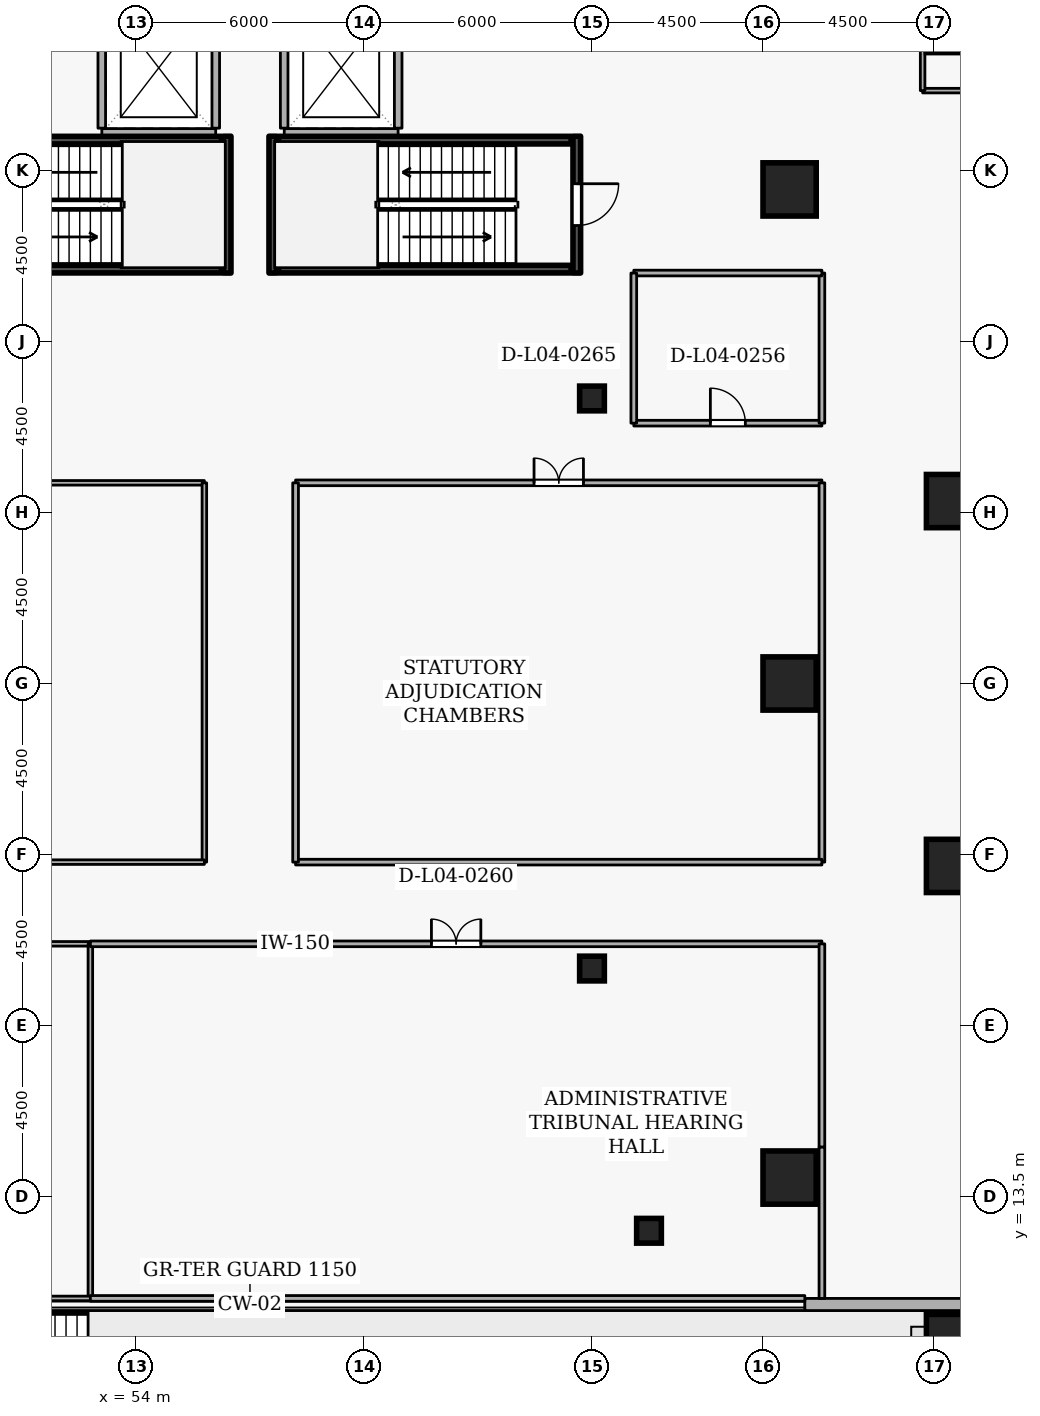
"""IFC4 building model, lengths in metres.
Left out: names, types, materials, properties, quantities, classifications, styles, units other than length and angle.
Written with IfcOpenShell. Run it as: python <this file> out.ifc"""

import sys

from ifc_helpers import new_model, si_unit, direction, frame, frame_2d, origin, origin_2d, place, context, subcontext, project, spatial, rectangle, extrude, element, fill, save


model = new_model("IFC4")
c1 = context("Model", 3, precision=1e-05, world=origin(), true_north=direction((0.0, 1.0)))
c2 = subcontext(c1, "Body", "Model", "MODEL_VIEW")
j1 = project(units=[si_unit("LENGTHUNIT", "METRE"), si_unit("PLANEANGLEUNIT", "RADIAN")], contexts=[c1])
p1 = place(None, origin())
s1 = spatial("IfcSite", under=j1, at=p1, CompositionType="ELEMENT")
p2 = place(p1, origin())
s2 = spatial("IfcBuilding", under=s1, at=p2, CompositionType="ELEMENT")
p3 = place(p2, frame((0.0, 0.0, 18.6)))
s3 = spatial("IfcBuildingStorey", under=s2, at=p3, CompositionType="ELEMENT", Elevation=18.6)
for number, where, z_axis, x_axis in (
    (1, (71.2, 14.0, 0.0), (0.0, 0.0, 1.0), (1.0, 0.0, 0.0)),
    (2, (71.2, 27.0, 0.0), (0.0, 0.0, 1.0), (1.0, 0.0, 0.0)),
    (3, (71.2, 40.0, 0.0), (0.0, 0.0, 1.0), (1.0, 0.0, 0.0)),
    (4, (75.5, 9.7, 0.0), (0.0, 0.0, 1.0), (1.0, 0.0, 0.0)),
    (5, (75.5, 22.2, 0.0), (0.0, 0.0, 1.0), (1.0, 0.0, 0.0)),
    (6, (75.5, 31.8, 0.0), (0.0, 0.0, 1.0), (1.0, 0.0, 0.0)),
):
    element("IfcColumn", number, at=place(p3, frame(where, z_axis=z_axis, x_axis=x_axis)), inside=s3, PredefinedType="COLUMN", context=c2, shape_type="SweptSolid", body=[
        extrude(rectangle(XDim=1.4, YDim=1.4, at=origin_2d()), origin(), (0.0, 0.0, 1.0), 4.5),
    ])
for number, where, z_axis, x_axis in (
    (7, (67.5, 12.6, 0.0), (0.0, 0.0, 1.0), (1.0, 0.0, 0.0)),
    (8, (66.0, 19.5, 0.0), (0.0, 0.0, 1.0), (1.0, 0.0, 0.0)),
    (9, (66.0, 34.5, 0.0), (0.0, 0.0, 1.0), (1.0, 0.0, 0.0)),
):
    element("IfcColumn", number, at=place(p3, frame(where, z_axis=z_axis, x_axis=x_axis)), inside=s3, PredefinedType="COLUMN", context=c2, shape_type="SweptSolid", body=[
        extrude(rectangle(XDim=0.65, YDim=0.65, at=origin_2d()), origin(), (0.0, 0.0, 1.0), 4.5),
    ])
p4 = place(p3, frame((71.6, 10.66, 0.0), z_axis=(0.0, 0.0, 1.0), x_axis=(1.0, 0.0, 0.0)))
e10 = element("IfcWall", 10, at=p4, inside=s3, PredefinedType="STANDARD", context=c2, shape_type="SweptSolid", body=[
    extrude(rectangle(XDim=39.4, YDim=0.32, at=frame_2d((19.7, 0.0))), origin(), (0.0, 0.0, 1.0), 3.56),
])
p5 = place(p4, frame((13.5, 0.0, 0.0)))
e11 = element("IfcOpeningElement", 11, at=p5, cuts=e10, PredefinedType="OPENING", context=c2, shape_type="SweptSolid", body=[
    extrude(rectangle(XDim=1.15, YDim=2.1, at=frame_2d((0.575, 1.05))), frame((0.0, 0.17, 0.0), z_axis=(0.0, -1.0, 0.0), x_axis=(1.0, 0.0, 0.0)), (0.0, 0.0, 1.0), 0.34),
])
p6 = place(p4, frame((22.8, 0.0, 0.78)))
e12 = element("IfcOpeningElement", 12, at=p6, cuts=e10, PredefinedType="OPENING", context=c2, shape_type="SweptSolid", body=[
    extrude(rectangle(XDim=1.8, YDim=2.15, at=frame_2d((0.9, 1.075))), frame((0.0, 0.17, 0.0), z_axis=(0.0, -1.0, 0.0), x_axis=(1.0, 0.0, 0.0)), (0.0, 0.0, 1.0), 0.34),
])
p7 = place(p4, frame((32.8, 0.0, 0.78)))
e13 = element("IfcOpeningElement", 13, at=p7, cuts=e10, PredefinedType="OPENING", context=c2, shape_type="SweptSolid", body=[
    extrude(rectangle(XDim=1.8, YDim=2.15, at=frame_2d((0.9, 1.075))), frame((0.0, 0.17, 0.0), z_axis=(0.0, -1.0, 0.0), x_axis=(1.0, 0.0, 0.0)), (0.0, 0.0, 1.0), 0.34),
])
p8 = place(p3, frame((53.102, 41.5, 0.0), z_axis=(0.0, 0.0, 1.0), x_axis=(1.0, 0.0, 0.0)))
e14 = element("IfcWall", 14, at=p8, inside=s3, PredefinedType="STANDARD", context=c2, shape_type="SweptSolid", body=[
    extrude(rectangle(XDim=2.996, YDim=0.2, at=frame_2d((1.498, 0.0))), origin(), (0.0, 0.0, 1.0), 4.16),
])
for number, where, z_axis, x_axis in (
    (15, (56.1, 41.612, 0.0), (0.0, 0.0, 1.0), (0.0, 1.0, 0.0)),
    (16, (53.1, 41.612, 0.0), (0.0, 0.0, 1.0), (0.0, 1.0, 0.0)),
):
    element("IfcWall", number, at=place(p3, frame(where, z_axis=z_axis, x_axis=x_axis)), inside=s3, PredefinedType="STANDARD", context=c2, shape_type="SweptSolid", body=[
        extrude(rectangle(XDim=3.286, YDim=0.2, at=frame_2d((1.643, 0.0))), origin(), (0.0, 0.0, 1.0), 4.16),
    ])
p9 = place(p3, frame((57.902, 41.5, 0.0), z_axis=(0.0, 0.0, 1.0), x_axis=(1.0, 0.0, 0.0)))
e17 = element("IfcWall", 17, at=p9, inside=s3, PredefinedType="STANDARD", context=c2, shape_type="SweptSolid", body=[
    extrude(rectangle(XDim=2.996, YDim=0.2, at=frame_2d((1.498, 0.0))), origin(), (0.0, 0.0, 1.0), 4.16),
])
for number, where, z_axis, x_axis in (
    (18, (60.9, 41.612, 0.0), (0.0, 0.0, 1.0), (0.0, 1.0, 0.0)),
    (19, (57.9, 41.612, 0.0), (0.0, 0.0, 1.0), (0.0, 1.0, 0.0)),
):
    element("IfcWall", number, at=place(p3, frame(where, z_axis=z_axis, x_axis=x_axis)), inside=s3, PredefinedType="STANDARD", context=c2, shape_type="SweptSolid", body=[
        extrude(rectangle(XDim=3.286, YDim=0.2, at=frame_2d((1.643, 0.0))), origin(), (0.0, 0.0, 1.0), 4.16),
    ])
p10 = place(p3, frame((56.4, 41.4, 0.0), z_axis=(0.0, 0.0, 1.0), x_axis=(0.0, -1.0, 0.0)))
e20 = element("IfcWall", 20, at=p10, inside=s3, PredefinedType="SHEAR", context=c2, shape_type="SweptSolid", body=[
    extrude(rectangle(XDim=3.6, YDim=0.2, at=frame_2d((1.8, 0.0))), origin(), (0.0, 0.0, 1.0), 4.5),
])
for number, where, z_axis, x_axis in (
    (21, (56.25, 41.297, 0.0), (0.0, 0.0, 1.0), (-1.0, 0.0, 0.0)),
    (22, (48.55, 37.903, 0.0), (0.0, 0.0, 1.0), (1.0, 0.0, 0.0)),
):
    element("IfcWall", number, at=place(p3, frame(where, z_axis=z_axis, x_axis=x_axis)), inside=s3, PredefinedType="SHEAR", context=c2, shape_type="SweptSolid", body=[
        extrude(rectangle(XDim=7.7, YDim=0.2, at=frame_2d((3.85, 0.0))), origin(), (0.0, 0.0, 1.0), 4.5),
    ])
p11 = place(p3, frame((65.6, 41.4, 0.0), z_axis=(0.0, 0.0, 1.0), x_axis=(0.0, -1.0, 0.0)))
e23 = element("IfcWall", 23, at=p11, inside=s3, PredefinedType="SHEAR", context=c2, shape_type="SweptSolid", body=[
    extrude(rectangle(XDim=3.6, YDim=0.2, at=frame_2d((1.8, 0.0))), origin(), (0.0, 0.0, 1.0), 4.5),
])
p12 = place(p11, frame((1.25, 0.0, 0.0)))
e24 = element("IfcOpeningElement", 24, at=p12, cuts=e23, PredefinedType="OPENING", context=c2, shape_type="SweptSolid", body=[
    extrude(rectangle(XDim=1.1, YDim=2.1, at=frame_2d((0.55, 1.05))), frame((0.0, 0.11, 0.0), z_axis=(0.0, -1.0, 0.0), x_axis=(1.0, 0.0, 0.0)), (0.0, 0.0, 1.0), 0.22),
])
p13 = place(p3, frame((57.6, 37.8, 0.0), z_axis=(0.0, 0.0, 1.0), x_axis=(0.0, 1.0, 0.0)))
e25 = element("IfcWall", 25, at=p13, inside=s3, PredefinedType="SHEAR", context=c2, shape_type="SweptSolid", body=[
    extrude(rectangle(XDim=3.6, YDim=0.2, at=frame_2d((1.8, 0.0))), origin(), (0.0, 0.0, 1.0), 4.5),
])
for number, where, z_axis, x_axis in (
    (26, (57.75, 37.903, 0.0), (0.0, 0.0, 1.0), (1.0, 0.0, 0.0)),
    (27, (65.45, 41.297, 0.0), (0.0, 0.0, 1.0), (-1.0, 0.0, 0.0)),
):
    element("IfcWall", number, at=place(p3, frame(where, z_axis=z_axis, x_axis=x_axis)), inside=s3, PredefinedType="SHEAR", context=c2, shape_type="SweptSolid", body=[
        extrude(rectangle(XDim=7.7, YDim=0.2, at=frame_2d((3.85, 0.0))), origin(), (0.0, 0.0, 1.0), 4.5),
    ])
p14 = place(p3, frame((67.1, 33.85, 0.0), z_axis=(0.0, 0.0, 1.0), x_axis=(1.0, 0.0, 0.0)))
e28 = element("IfcWall", 28, at=p14, inside=s3, PredefinedType="PARTITIONING", context=c2, shape_type="SweptSolid", body=[
    extrude(rectangle(XDim=4.95, YDim=0.15, at=frame_2d((2.475, 0.0))), origin(), (0.0, 0.0, 1.0), 4.16),
])
p15 = place(p14, frame((2.015, 0.0, 0.0)))
e29 = element("IfcOpeningElement", 29, at=p15, cuts=e28, PredefinedType="OPENING", context=c2, shape_type="SweptSolid", body=[
    extrude(rectangle(XDim=0.92, YDim=2.08, at=frame_2d((0.46, 1.04))), frame((0.0, 0.085, 0.0), z_axis=(0.0, -1.0, 0.0), x_axis=(1.0, 0.0, 0.0)), (0.0, 0.0, 1.0), 0.17),
])
p16 = place(p3, frame((72.05, 33.85, 0.0), z_axis=(0.0, 0.0, 1.0), x_axis=(0.0, 1.0, 0.0)))
e30 = element("IfcWall", 30, at=p16, inside=s3, PredefinedType="PARTITIONING", context=c2, shape_type="SweptSolid", body=[
    extrude(rectangle(XDim=3.95, YDim=0.15, at=frame_2d((1.975, 0.0))), origin(), (0.0, 0.0, 1.0), 4.16),
])
p17 = place(p3, frame((72.05, 37.8, 0.0), z_axis=(0.0, 0.0, 1.0), x_axis=(-1.0, 0.0, 0.0)))
e31 = element("IfcWall", 31, at=p17, inside=s3, PredefinedType="PARTITIONING", context=c2, shape_type="SweptSolid", body=[
    extrude(rectangle(XDim=4.95, YDim=0.15, at=frame_2d((2.475, 0.0))), origin(), (0.0, 0.0, 1.0), 4.16),
])
p18 = place(p3, frame((67.1, 37.8, 0.0), z_axis=(0.0, 0.0, 1.0), x_axis=(0.0, -1.0, 0.0)))
e32 = element("IfcWall", 32, at=p18, inside=s3, PredefinedType="PARTITIONING", context=c2, shape_type="SweptSolid", body=[
    extrude(rectangle(XDim=3.95, YDim=0.15, at=frame_2d((1.975, 0.0))), origin(), (0.0, 0.0, 1.0), 4.16),
])
p19 = place(p3, frame((33.5, 20.15, 0.0), z_axis=(0.0, 0.0, 1.0), x_axis=(1.0, 0.0, 0.0)))
e33 = element("IfcWall", 33, at=p19, inside=s3, PredefinedType="PARTITIONING", context=c2, shape_type="SweptSolid", body=[
    extrude(rectangle(XDim=19.3, YDim=0.12, at=frame_2d((9.65, 0.0))), origin(), (0.0, 0.0, 1.0), 4.16),
])
p20 = place(p19, frame((9.125, 0.0, 0.0)))
e34 = element("IfcOpeningElement", 34, at=p20, cuts=e33, PredefinedType="OPENING", context=c2, shape_type="SweptSolid", body=[
    extrude(rectangle(XDim=1.05, YDim=2.1, at=frame_2d((0.525, 1.05))), frame((0.0, 0.07, 0.0), z_axis=(0.0, -1.0, 0.0), x_axis=(1.0, 0.0, 0.0)), (0.0, 0.0, 1.0), 0.14),
])
p21 = place(p3, frame((52.8, 20.15, 0.0), z_axis=(0.0, 0.0, 1.0), x_axis=(0.0, -1.0, 0.0)))
e35 = element("IfcWall", 35, at=p21, inside=s3, PredefinedType="PARTITIONING", context=c2, shape_type="SweptSolid", body=[
    extrude(rectangle(XDim=9.33, YDim=0.12, at=frame_2d((4.665, 0.0))), origin(), (0.0, 0.0, 1.0), 4.16),
])
p22 = place(p3, frame((52.8, 10.82, 0.0), z_axis=(0.0, 0.0, 1.0), x_axis=(-1.0, 0.0, 0.0)))
e36 = element("IfcWall", 36, at=p22, inside=s3, PredefinedType="PARTITIONING", context=c2, shape_type="SweptSolid", body=[
    extrude(rectangle(XDim=10.4, YDim=0.12, at=frame_2d((5.2, 0.0))), origin(), (0.0, 0.0, 1.0), 4.16),
])
p23 = place(p3, frame((52.8, 20.15, 0.0), z_axis=(0.0, 0.0, 1.0), x_axis=(1.0, 0.0, 0.0)))
e37 = element("IfcWall", 37, at=p23, inside=s3, PredefinedType="PARTITIONING", context=c2, shape_type="SweptSolid", body=[
    extrude(rectangle(XDim=19.25, YDim=0.15, at=frame_2d((9.625, 0.0))), origin(), (0.0, 0.0, 1.0), 4.16),
])
p24 = place(p23, frame((8.975, 0.0, 0.0)))
e38 = element("IfcOpeningElement", 38, at=p24, cuts=e37, PredefinedType="OPENING", context=c2, shape_type="SweptSolid", body=[
    extrude(rectangle(XDim=1.3, YDim=2.12, at=frame_2d((0.65, 1.06))), frame((0.0, 0.085, 0.0), z_axis=(0.0, -1.0, 0.0), x_axis=(1.0, 0.0, 0.0)), (0.0, 0.0, 1.0), 0.17),
])
p25 = place(p3, frame((72.05, 20.15, 0.0), z_axis=(0.0, 0.0, 1.0), x_axis=(0.0, -1.0, 0.0)))
e39 = element("IfcWall", 39, at=p25, inside=s3, PredefinedType="PARTITIONING", context=c2, shape_type="SweptSolid", body=[
    extrude(rectangle(XDim=5.35, YDim=0.15, at=frame_2d((2.675, 0.0))), origin(), (0.0, 0.0, 1.0), 4.16),
])
p26 = place(p3, frame((72.05, 14.8, 0.0), z_axis=(0.0, 0.0, 1.0), x_axis=(0.0, -1.0, 0.0)))
e40 = element("IfcWall", 40, at=p26, inside=s3, PredefinedType="PARTITIONING", context=c2, shape_type="SweptSolid", body=[
    extrude(rectangle(XDim=3.98, YDim=0.15, at=frame_2d((1.99, 0.0))), origin(), (0.0, 0.0, 1.0), 4.16),
])
p27 = place(p3, frame((71.6, 10.82, 0.0), z_axis=(0.0, 0.0, 1.0), x_axis=(-1.0, 0.0, 0.0)))
e41 = element("IfcWall", 41, at=p27, inside=s3, PredefinedType="PARTITIONING", context=c2, shape_type="SweptSolid", body=[
    extrude(rectangle(XDim=18.8, YDim=0.15, at=frame_2d((9.4, 0.0))), origin(), (0.0, 0.0, 1.0), 4.16),
])
p28 = place(p3, frame((38.0, 32.28, 0.0), z_axis=(0.0, 0.0, 1.0), x_axis=(1.0, 0.0, 0.0)))
e42 = element("IfcWall", 42, at=p28, inside=s3, PredefinedType="PARTITIONING", context=c2, shape_type="SweptSolid", body=[
    extrude(rectangle(XDim=17.8, YDim=0.12, at=frame_2d((8.9, 0.0))), origin(), (0.0, 0.0, 1.0), 4.16),
])
p29 = place(p28, frame((8.375, 0.0, 0.0)))
e43 = element("IfcOpeningElement", 43, at=p29, cuts=e42, PredefinedType="OPENING", context=c2, shape_type="SweptSolid", body=[
    extrude(rectangle(XDim=1.05, YDim=2.1, at=frame_2d((0.525, 1.05))), frame((0.0, 0.07, 0.0), z_axis=(0.0, -1.0, 0.0), x_axis=(1.0, 0.0, 0.0)), (0.0, 0.0, 1.0), 0.14),
])
p30 = place(p3, frame((55.8, 32.28, 0.0), z_axis=(0.0, 0.0, 1.0), x_axis=(0.0, -1.0, 0.0)))
e44 = element("IfcWall", 44, at=p30, inside=s3, PredefinedType="PARTITIONING", context=c2, shape_type="SweptSolid", body=[
    extrude(rectangle(XDim=9.98, YDim=0.12, at=frame_2d((4.99, 0.0))), origin(), (0.0, 0.0, 1.0), 4.16),
])
p31 = place(p3, frame((55.8, 22.3, 0.0), z_axis=(0.0, 0.0, 1.0), x_axis=(-1.0, 0.0, 0.0)))
e45 = element("IfcWall", 45, at=p31, inside=s3, PredefinedType="PARTITIONING", context=c2, shape_type="SweptSolid", body=[
    extrude(rectangle(XDim=17.8, YDim=0.12, at=frame_2d((8.9, 0.0))), origin(), (0.0, 0.0, 1.0), 4.16),
])
p32 = place(p3, frame((58.2, 32.28, 0.0), z_axis=(0.0, 0.0, 1.0), x_axis=(1.0, 0.0, 0.0)))
e46 = element("IfcWall", 46, at=p32, inside=s3, PredefinedType="PARTITIONING", context=c2, shape_type="SweptSolid", body=[
    extrude(rectangle(XDim=13.85, YDim=0.15, at=frame_2d((6.925, 0.0))), origin(), (0.0, 0.0, 1.0), 4.16),
])
p33 = place(p32, frame((6.275, 0.0, 0.0)))
e47 = element("IfcOpeningElement", 47, at=p33, cuts=e46, PredefinedType="OPENING", context=c2, shape_type="SweptSolid", body=[
    extrude(rectangle(XDim=1.3, YDim=2.12, at=frame_2d((0.65, 1.06))), frame((0.0, 0.085, 0.0), z_axis=(0.0, -1.0, 0.0), x_axis=(1.0, 0.0, 0.0)), (0.0, 0.0, 1.0), 0.17),
])
p34 = place(p3, frame((72.05, 32.28, 0.0), z_axis=(0.0, 0.0, 1.0), x_axis=(0.0, -1.0, 0.0)))
e48 = element("IfcWall", 48, at=p34, inside=s3, PredefinedType="PARTITIONING", context=c2, shape_type="SweptSolid", body=[
    extrude(rectangle(XDim=9.98, YDim=0.15, at=frame_2d((4.99, 0.0))), origin(), (0.0, 0.0, 1.0), 4.16),
])
p35 = place(p3, frame((72.05, 22.3, 0.0), z_axis=(0.0, 0.0, 1.0), x_axis=(-1.0, 0.0, 0.0)))
e49 = element("IfcWall", 49, at=p35, inside=s3, PredefinedType="PARTITIONING", context=c2, shape_type="SweptSolid", body=[
    extrude(rectangle(XDim=13.85, YDim=0.15, at=frame_2d((6.925, 0.0))), origin(), (0.0, 0.0, 1.0), 4.16),
])
p36 = place(p3, frame((58.2, 22.3, 0.0), z_axis=(0.0, 0.0, 1.0), x_axis=(0.0, 1.0, 0.0)))
e50 = element("IfcWall", 50, at=p36, inside=s3, PredefinedType="PARTITIONING", context=c2, shape_type="SweptSolid", body=[
    extrude(rectangle(XDim=9.98, YDim=0.15, at=frame_2d((4.99, 0.0))), origin(), (0.0, 0.0, 1.0), 4.16),
])
p37 = place(p3, frame((88.5, 42.6, 0.0), z_axis=(0.0, 0.0, 1.0), x_axis=(-1.0, 0.0, 0.0)))
e51 = element("IfcWall", 51, at=p37, inside=s3, PredefinedType="PARTITIONING", context=c2, shape_type="SweptSolid", body=[
    extrude(rectangle(XDim=13.8, YDim=0.12, at=frame_2d((6.9, 0.0))), origin(), (0.0, 0.0, 1.0), 4.16),
])
p38 = place(p37, frame((6.375, 0.0, 0.0)))
e52 = element("IfcOpeningElement", 52, at=p38, cuts=e51, PredefinedType="OPENING", context=c2, shape_type="SweptSolid", body=[
    extrude(rectangle(XDim=1.05, YDim=2.1, at=frame_2d((0.525, 1.05))), frame((0.0, 0.07, 0.0), z_axis=(0.0, -1.0, 0.0), x_axis=(1.0, 0.0, 0.0)), (0.0, 0.0, 1.0), 0.14),
])
p39 = place(p3, frame((74.7, 42.6, 0.0), z_axis=(0.0, 0.0, 1.0), x_axis=(0.0, 1.0, 0.0)))
e53 = element("IfcWall", 53, at=p39, inside=s3, PredefinedType="PARTITIONING", context=c2, shape_type="SweptSolid", body=[
    extrude(rectangle(XDim=6.58, YDim=0.12, at=frame_2d((3.29, 0.0))), origin(), (0.0, 0.0, 1.0), 4.16),
])
p40 = place(p12, origin())
e54 = element("IfcDoor", 54, at=p40, inside=s3, OperationType="SINGLE_SWING_LEFT", PredefinedType="DOOR", context=c2, shape_type="SweptSolid", body=[
    extrude(rectangle(XDim=1.1, YDim=2.1, at=frame_2d((0.55, 1.05))), frame((0.0, 0.025, 0.0), z_axis=(0.0, -1.0, 0.0), x_axis=(1.0, 0.0, 0.0)), (0.0, 0.0, 1.0), 0.05),
])
fill(e24, e54)
p41 = place(p15, origin())
e55 = element("IfcDoor", 55, at=p41, inside=s3, OperationType="SINGLE_SWING_LEFT", PredefinedType="DOOR", context=c2, shape_type="SweptSolid", body=[
    extrude(rectangle(XDim=0.92, YDim=2.08, at=frame_2d((0.46, 1.04))), frame((0.0, 0.025, 0.0), z_axis=(0.0, -1.0, 0.0), x_axis=(1.0, 0.0, 0.0)), (0.0, 0.0, 1.0), 0.05),
])
fill(e29, e55)
p42 = place(p24, origin())
e56 = element("IfcDoor", 56, at=p42, inside=s3, OperationType="DOUBLE_DOOR_SINGLE_SWING", PredefinedType="DOOR", context=c2, shape_type="SweptSolid", body=[
    extrude(rectangle(XDim=1.3, YDim=2.12, at=frame_2d((0.65, 1.06))), frame((0.0, 0.025, 0.0), z_axis=(0.0, -1.0, 0.0), x_axis=(1.0, 0.0, 0.0)), (0.0, 0.0, 1.0), 0.05),
])
fill(e38, e56)
p43 = place(p33, origin())
e57 = element("IfcDoor", 57, at=p43, inside=s3, OperationType="DOUBLE_DOOR_SINGLE_SWING", PredefinedType="DOOR", context=c2, shape_type="SweptSolid", body=[
    extrude(rectangle(XDim=1.3, YDim=2.12, at=frame_2d((0.65, 1.06))), frame((0.0, 0.025, 0.0), z_axis=(0.0, -1.0, 0.0), x_axis=(1.0, 0.0, 0.0)), (0.0, 0.0, 1.0), 0.05),
])
fill(e47, e57)
save(model, sys.argv[1])
